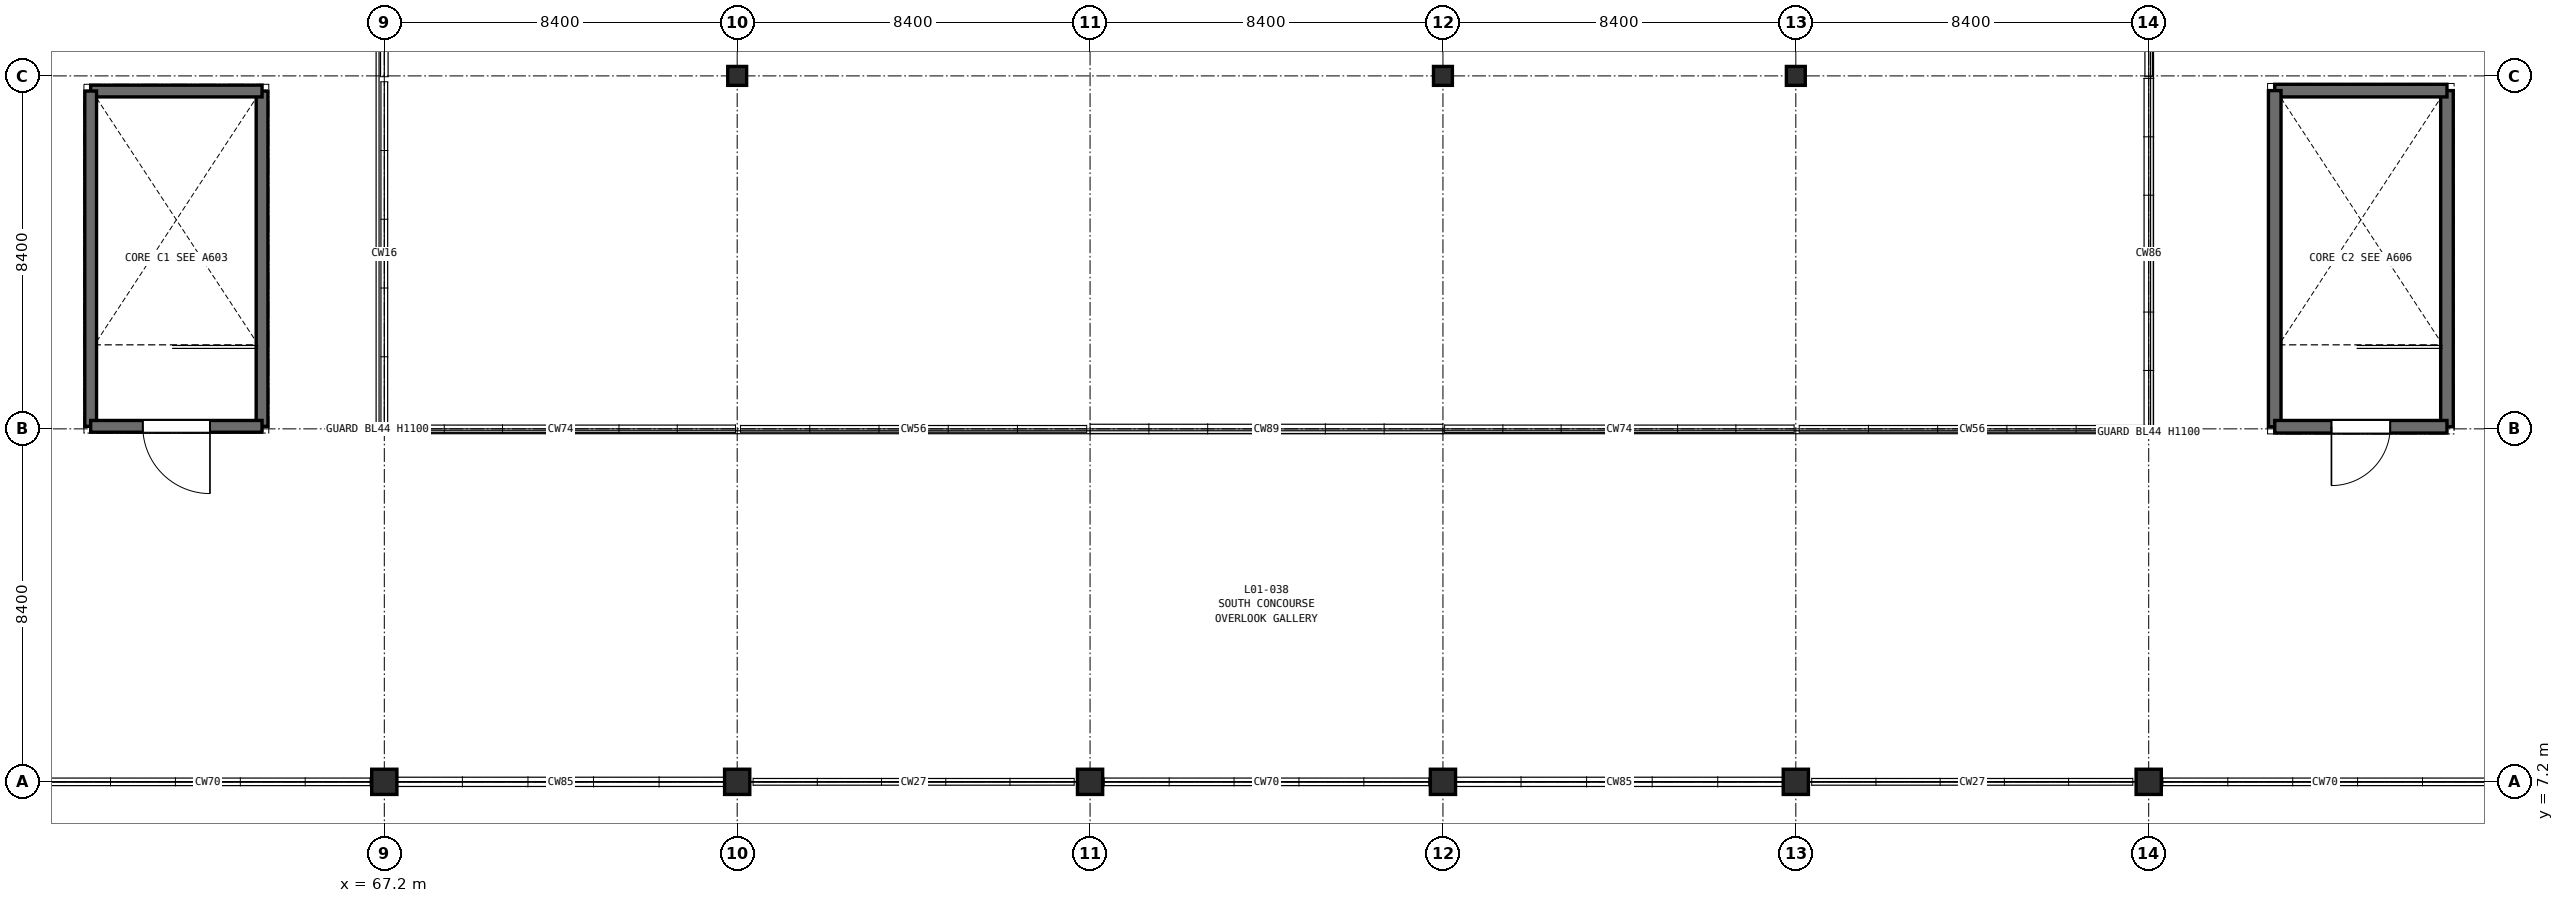
"""IFC4 building model, lengths in metres.
Left out: names, types, materials, properties, quantities, classifications, styles, units other than length and angle.
Written with IfcOpenShell. Run it as: python <this file> out.ifc"""

import sys

from ifc_helpers import new_model, si_unit, direction, frame, frame_2d, origin, origin_2d, place, context, subcontext, project, spatial, rectangle, extrude, element, fill, save


model = new_model("IFC4")
c1 = context("Model", 3, precision=1e-05, world=origin(), true_north=direction((0.0, 1.0)))
c2 = subcontext(c1, "Body", "Model", "MODEL_VIEW")
j1 = project(units=[si_unit("LENGTHUNIT", "METRE"), si_unit("PLANEANGLEUNIT", "RADIAN")], contexts=[c1])
p1 = place(None, origin())
s1 = spatial("IfcSite", under=j1, at=p1, CompositionType="ELEMENT")
p2 = place(p1, origin())
s2 = spatial("IfcBuilding", under=s1, at=p2, CompositionType="ELEMENT")
p3 = place(p2, frame((0.0, 0.0, 5.4)))
s3 = spatial("IfcBuildingStorey", under=s2, at=p3, CompositionType="ELEMENT", Elevation=5.4)
for number, where, z_axis, x_axis in (
    (1, (67.2, 7.2, 0.0), (0.0, 0.0, 1.0), (1.0, 0.0, 0.0)),
    (2, (75.6, 7.2, 0.0), (0.0, 0.0, 1.0), (1.0, 0.0, 0.0)),
):
    element("IfcColumn", number, at=place(p3, frame(where, z_axis=z_axis, x_axis=x_axis)), inside=s3, PredefinedType="COLUMN", context=c2, shape_type="SweptSolid", body=[
        extrude(rectangle(XDim=0.6, YDim=0.6, at=origin_2d()), origin(), (0.0, 0.0, 1.0), 5.4),
    ])
p4 = place(p3, frame((75.6, 24.0, 0.0), z_axis=(0.0, 0.0, 1.0), x_axis=(1.0, 0.0, 0.0)))
e3 = element("IfcColumn", 3, at=p4, inside=s3, PredefinedType="COLUMN", context=c2, shape_type="SweptSolid", body=[
    extrude(rectangle(XDim=0.45, YDim=0.45, at=origin_2d()), origin(), (0.0, 0.0, 1.0), 5.4),
])
for number, where, z_axis, x_axis in (
    (4, (84.0, 7.2, 0.0), (0.0, 0.0, 1.0), (1.0, 0.0, 0.0)),
    (5, (92.4, 7.2, 0.0), (0.0, 0.0, 1.0), (1.0, 0.0, 0.0)),
):
    element("IfcColumn", number, at=place(p3, frame(where, z_axis=z_axis, x_axis=x_axis)), inside=s3, PredefinedType="COLUMN", context=c2, shape_type="SweptSolid", body=[
        extrude(rectangle(XDim=0.6, YDim=0.6, at=origin_2d()), origin(), (0.0, 0.0, 1.0), 5.4),
    ])
p5 = place(p3, frame((92.4, 24.0, 0.0), z_axis=(0.0, 0.0, 1.0), x_axis=(1.0, 0.0, 0.0)))
e6 = element("IfcColumn", 6, at=p5, inside=s3, PredefinedType="COLUMN", context=c2, shape_type="SweptSolid", body=[
    extrude(rectangle(XDim=0.45, YDim=0.45, at=origin_2d()), origin(), (0.0, 0.0, 1.0), 5.4),
])
p6 = place(p3, frame((100.8, 7.2, 0.0), z_axis=(0.0, 0.0, 1.0), x_axis=(1.0, 0.0, 0.0)))
e7 = element("IfcColumn", 7, at=p6, inside=s3, PredefinedType="COLUMN", context=c2, shape_type="SweptSolid", body=[
    extrude(rectangle(XDim=0.6, YDim=0.6, at=origin_2d()), origin(), (0.0, 0.0, 1.0), 5.4),
])
p7 = place(p3, frame((100.8, 24.0, 0.0), z_axis=(0.0, 0.0, 1.0), x_axis=(1.0, 0.0, 0.0)))
e8 = element("IfcColumn", 8, at=p7, inside=s3, PredefinedType="COLUMN", context=c2, shape_type="SweptSolid", body=[
    extrude(rectangle(XDim=0.45, YDim=0.45, at=origin_2d()), origin(), (0.0, 0.0, 1.0), 5.4),
])
p8 = place(p3, frame((109.2, 7.2, 0.0), z_axis=(0.0, 0.0, 1.0), x_axis=(1.0, 0.0, 0.0)))
e9 = element("IfcColumn", 9, at=p8, inside=s3, PredefinedType="COLUMN", context=c2, shape_type="SweptSolid", body=[
    extrude(rectangle(XDim=0.6, YDim=0.6, at=origin_2d()), origin(), (0.0, 0.0, 1.0), 5.4),
])
p9 = place(p3, frame((64.29, 15.66, 0.0), z_axis=(0.0, 0.0, 1.0), x_axis=(0.0, 1.0, 0.0)))
e10 = element("IfcWall", 10, at=p9, inside=s3, PredefinedType="SHEAR", context=c2, shape_type="SweptSolid", body=[
    extrude(rectangle(XDim=7.98, YDim=0.28, at=frame_2d((3.99, 0.0))), origin(), (0.0, 0.0, 1.0), 5.4),
])
p10 = place(p3, frame((64.29, 23.64, 0.0), z_axis=(0.0, 0.0, 1.0), x_axis=(-1.0, 0.0, 0.0)))
e11 = element("IfcWall", 11, at=p10, inside=s3, PredefinedType="SHEAR", context=c2, shape_type="SweptSolid", body=[
    extrude(rectangle(XDim=4.08, YDim=0.28, at=frame_2d((2.04, 0.0))), origin(), (0.0, 0.0, 1.0), 5.4),
])
p11 = place(p3, frame((60.21, 23.64, 0.0), z_axis=(0.0, 0.0, 1.0), x_axis=(0.0, -1.0, 0.0)))
e12 = element("IfcWall", 12, at=p11, inside=s3, PredefinedType="SHEAR", context=c2, shape_type="SweptSolid", body=[
    extrude(rectangle(XDim=7.98, YDim=0.28, at=frame_2d((3.99, 0.0))), origin(), (0.0, 0.0, 1.0), 5.4),
])
p12 = place(p3, frame((60.21, 15.66, 0.0), z_axis=(0.0, 0.0, 1.0), x_axis=(1.0, 0.0, 0.0)))
e13 = element("IfcWall", 13, at=p12, inside=s3, PredefinedType="SHEAR", context=c2, shape_type="SweptSolid", body=[
    extrude(rectangle(XDim=4.08, YDim=0.28, at=frame_2d((2.04, 0.0))), origin(), (0.0, 0.0, 1.0), 5.4),
])
p13 = place(p12, frame((1.24, 0.0, 0.0)))
e14 = element("IfcOpeningElement", 14, at=p13, cuts=e13, PredefinedType="OPENING", context=c2, shape_type="SweptSolid", body=[
    extrude(rectangle(XDim=1.6, YDim=2.25, at=frame_2d((0.8, 1.125))), frame((0.0, 0.15, 0.0), z_axis=(0.0, -1.0, 0.0), x_axis=(1.0, 0.0, 0.0)), (0.0, 0.0, 1.0), 0.3),
])
p14 = place(p3, frame((116.3, 15.65, 0.0), z_axis=(0.0, 0.0, 1.0), x_axis=(0.0, 1.0, 0.0)))
e15 = element("IfcWall", 15, at=p14, inside=s3, PredefinedType="SHEAR", context=c2, shape_type="SweptSolid", body=[
    extrude(rectangle(XDim=8.0, YDim=0.3, at=frame_2d((4.0, 0.0))), origin(), (0.0, 0.0, 1.0), 5.4),
])
p15 = place(p3, frame((116.3, 23.65, 0.0), z_axis=(0.0, 0.0, 1.0), x_axis=(-1.0, 0.0, 0.0)))
e16 = element("IfcWall", 16, at=p15, inside=s3, PredefinedType="SHEAR", context=c2, shape_type="SweptSolid", body=[
    extrude(rectangle(XDim=4.1, YDim=0.3, at=frame_2d((2.05, 0.0))), origin(), (0.0, 0.0, 1.0), 5.4),
])
p16 = place(p3, frame((112.2, 23.65, 0.0), z_axis=(0.0, 0.0, 1.0), x_axis=(0.0, -1.0, 0.0)))
e17 = element("IfcWall", 17, at=p16, inside=s3, PredefinedType="SHEAR", context=c2, shape_type="SweptSolid", body=[
    extrude(rectangle(XDim=8.0, YDim=0.3, at=frame_2d((4.0, 0.0))), origin(), (0.0, 0.0, 1.0), 5.4),
])
p17 = place(p3, frame((112.2, 15.65, 0.0), z_axis=(0.0, 0.0, 1.0), x_axis=(1.0, 0.0, 0.0)))
e18 = element("IfcWall", 18, at=p17, inside=s3, PredefinedType="SHEAR", context=c2, shape_type="SweptSolid", body=[
    extrude(rectangle(XDim=4.1, YDim=0.3, at=frame_2d((2.05, 0.0))), origin(), (0.0, 0.0, 1.0), 5.4),
])
p18 = place(p17, frame((1.35, 0.0, 0.0)))
e19 = element("IfcOpeningElement", 19, at=p18, cuts=e18, PredefinedType="OPENING", context=c2, shape_type="SweptSolid", body=[
    extrude(rectangle(XDim=1.4, YDim=2.2, at=frame_2d((0.7, 1.1))), frame((0.0, 0.16, 0.0), z_axis=(0.0, -1.0, 0.0), x_axis=(1.0, 0.0, 0.0)), (0.0, 0.0, 1.0), 0.32),
])
p19 = place(p13, frame((1.6, 0.0, 0.0), z_axis=(0.0, 0.0, 1.0), x_axis=(-1.0, 0.0, 0.0)))
e20 = element("IfcDoor", 20, at=p19, inside=s3, OperationType="SINGLE_SWING_LEFT", PredefinedType="DOOR", context=c2, shape_type="SweptSolid", body=[
    extrude(rectangle(XDim=1.6, YDim=2.25, at=frame_2d((0.8, 1.125))), frame((0.0, 0.025, 0.0), z_axis=(0.0, -1.0, 0.0), x_axis=(1.0, 0.0, 0.0)), (0.0, 0.0, 1.0), 0.05),
])
fill(e14, e20)
p20 = place(p18, frame((1.4, 0.0, 0.0), z_axis=(0.0, 0.0, 1.0), x_axis=(-1.0, 0.0, 0.0)))
e21 = element("IfcDoor", 21, at=p20, inside=s3, OperationType="SINGLE_SWING_RIGHT", PredefinedType="DOOR", context=c2, shape_type="SweptSolid", body=[
    extrude(rectangle(XDim=1.4, YDim=2.2, at=frame_2d((0.7, 1.1))), frame((0.0, 0.025, 0.0), z_axis=(0.0, -1.0, 0.0), x_axis=(1.0, 0.0, 0.0)), (0.0, 0.0, 1.0), 0.05),
])
fill(e19, e21)
save(model, sys.argv[1])
